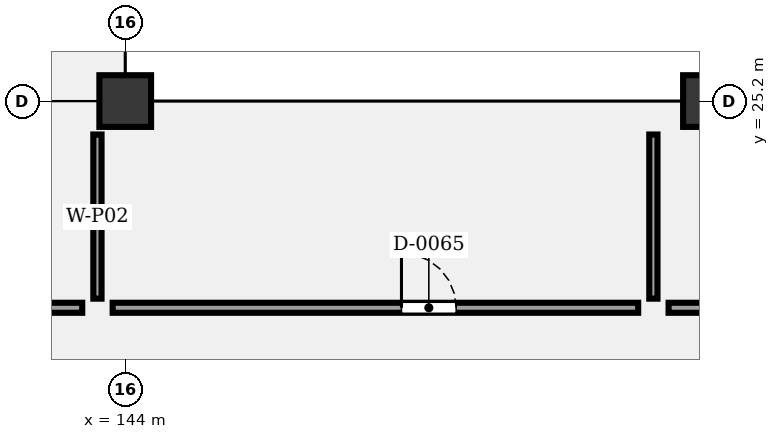
"""IFC4 building model, lengths in metres.
Left out: names, types, materials, properties, quantities, classifications, styles, units other than length and angle.
Written with IfcOpenShell. Run it as: python <this file> out.ifc"""

import sys

from ifc_helpers import new_model, si_unit, direction, frame, frame_2d, origin, origin_2d, place, context, subcontext, project, spatial, rectangle, extrude, element, fill, save


model = new_model("IFC4")
c1 = context("Model", 3, precision=1e-05, world=origin(), true_north=direction((0.0, 1.0)))
c2 = subcontext(c1, "Body", "Model", "MODEL_VIEW")
j1 = project(units=[si_unit("LENGTHUNIT", "METRE"), si_unit("PLANEANGLEUNIT", "RADIAN")], contexts=[c1])
p1 = place(None, origin())
s1 = spatial("IfcSite", under=j1, at=p1, CompositionType="ELEMENT")
p2 = place(p1, origin())
s2 = spatial("IfcBuilding", under=s1, at=p2, CompositionType="ELEMENT")
p3 = place(p2, origin())
s3 = spatial("IfcBuildingStorey", under=s2, at=p3, CompositionType="ELEMENT", Elevation=0.0)
for number, where, z_axis, x_axis in (
    (1, (144.0, 25.2, -0.35), (0.0, 0.0, 1.0), (1.0, 0.0, 0.0)),
    (2, (153.6, 25.2, -0.35), (0.0, 0.0, 1.0), (1.0, 0.0, 0.0)),
):
    element("IfcColumn", number, at=place(p3, frame(where, z_axis=z_axis, x_axis=x_axis)), inside=s3, PredefinedType="COLUMN", context=c2, shape_type="SweptSolid", body=[
        extrude(rectangle(XDim=0.85, YDim=0.85, at=origin_2d()), origin(), (0.0, 0.0, 1.0), 5.45),
    ])
p4 = place(p3, frame((134.65, 21.8, 0.0), z_axis=(0.0, 0.0, 1.0), x_axis=(1.0, 0.0, 0.0)))
e3 = element("IfcWall", 3, at=p4, inside=s3, PredefinedType="PARTITIONING", context=c2, shape_type="SweptSolid", body=[
    extrude(rectangle(XDim=8.643, YDim=0.165, at=frame_2d((4.322, 0.0))), origin(), (0.0, 0.0, 1.0), 3.98),
])
p5 = place(p4, frame((4.75, 0.0, 0.0)))
e4 = element("IfcOpeningElement", 4, at=p5, cuts=e3, PredefinedType="OPENING", context=c2, shape_type="SweptSolid", body=[
    extrude(rectangle(XDim=1.05, YDim=2.1, at=frame_2d((0.525, 1.05))), frame((0.0, 0.093, 0.0), z_axis=(0.0, -1.0, 0.0), x_axis=(1.0, 0.0, 0.0)), (0.0, 0.0, 1.0), 0.185),
])
p6 = place(p3, frame((143.793, 21.8, 0.0), z_axis=(0.0, 0.0, 1.0), x_axis=(1.0, 0.0, 0.0)))
e5 = element("IfcWall", 5, at=p6, inside=s3, PredefinedType="PARTITIONING", context=c2, shape_type="SweptSolid", body=[
    extrude(rectangle(XDim=8.643, YDim=0.165, at=frame_2d((4.322, 0.0))), origin(), (0.0, 0.0, 1.0), 3.98),
])
p7 = place(p6, frame((4.75, 0.0, 0.0)))
e6 = element("IfcOpeningElement", 6, at=p7, cuts=e5, PredefinedType="OPENING", context=c2, shape_type="SweptSolid", body=[
    extrude(rectangle(XDim=0.9, YDim=2.1, at=frame_2d((0.45, 1.05))), frame((0.0, 0.093, 0.0), z_axis=(0.0, -1.0, 0.0), x_axis=(1.0, 0.0, 0.0)), (0.0, 0.0, 1.0), 0.185),
])
p8 = place(p3, frame((143.543, 21.95, 0.0), z_axis=(0.0, 0.0, 1.0), x_axis=(0.0, 1.0, 0.0)))
e7 = element("IfcWall", 7, at=p8, inside=s3, PredefinedType="PARTITIONING", context=c2, shape_type="SweptSolid", body=[
    extrude(rectangle(XDim=2.7, YDim=0.135, at=frame_2d((1.35, 0.0))), origin(), (0.0, 0.0, 1.0), 3.98),
])
p9 = place(p3, frame((152.936, 21.8, 0.0), z_axis=(0.0, 0.0, 1.0), x_axis=(1.0, 0.0, 0.0)))
e8 = element("IfcWall", 8, at=p9, inside=s3, PredefinedType="PARTITIONING", context=c2, shape_type="SweptSolid", body=[
    extrude(rectangle(XDim=8.643, YDim=0.165, at=frame_2d((4.322, 0.0))), origin(), (0.0, 0.0, 1.0), 3.98),
])
p10 = place(p9, frame((5.1, 0.0, 0.0)))
e9 = element("IfcOpeningElement", 9, at=p10, cuts=e8, PredefinedType="OPENING", context=c2, shape_type="SweptSolid", body=[
    extrude(rectangle(XDim=0.95, YDim=2.1, at=frame_2d((0.475, 1.05))), frame((0.0, 0.093, 0.0), z_axis=(0.0, -1.0, 0.0), x_axis=(1.0, 0.0, 0.0)), (0.0, 0.0, 1.0), 0.185),
])
p11 = place(p3, frame((152.686, 21.95, 0.0), z_axis=(0.0, 0.0, 1.0), x_axis=(0.0, 1.0, 0.0)))
e10 = element("IfcWall", 10, at=p11, inside=s3, PredefinedType="PARTITIONING", context=c2, shape_type="SweptSolid", body=[
    extrude(rectangle(XDim=2.7, YDim=0.135, at=frame_2d((1.35, 0.0))), origin(), (0.0, 0.0, 1.0), 3.98),
])
p12 = place(p7, origin())
e11 = element("IfcDoor", 11, at=p12, inside=s3, OperationType="SINGLE_SWING_LEFT", PredefinedType="DOOR", context=c2, shape_type="SweptSolid", body=[
    extrude(rectangle(XDim=0.9, YDim=2.1, at=frame_2d((0.45, 1.05))), frame((0.0, 0.025, 0.0), z_axis=(0.0, -1.0, 0.0), x_axis=(1.0, 0.0, 0.0)), (0.0, 0.0, 1.0), 0.05),
])
fill(e6, e11)
save(model, sys.argv[1])
